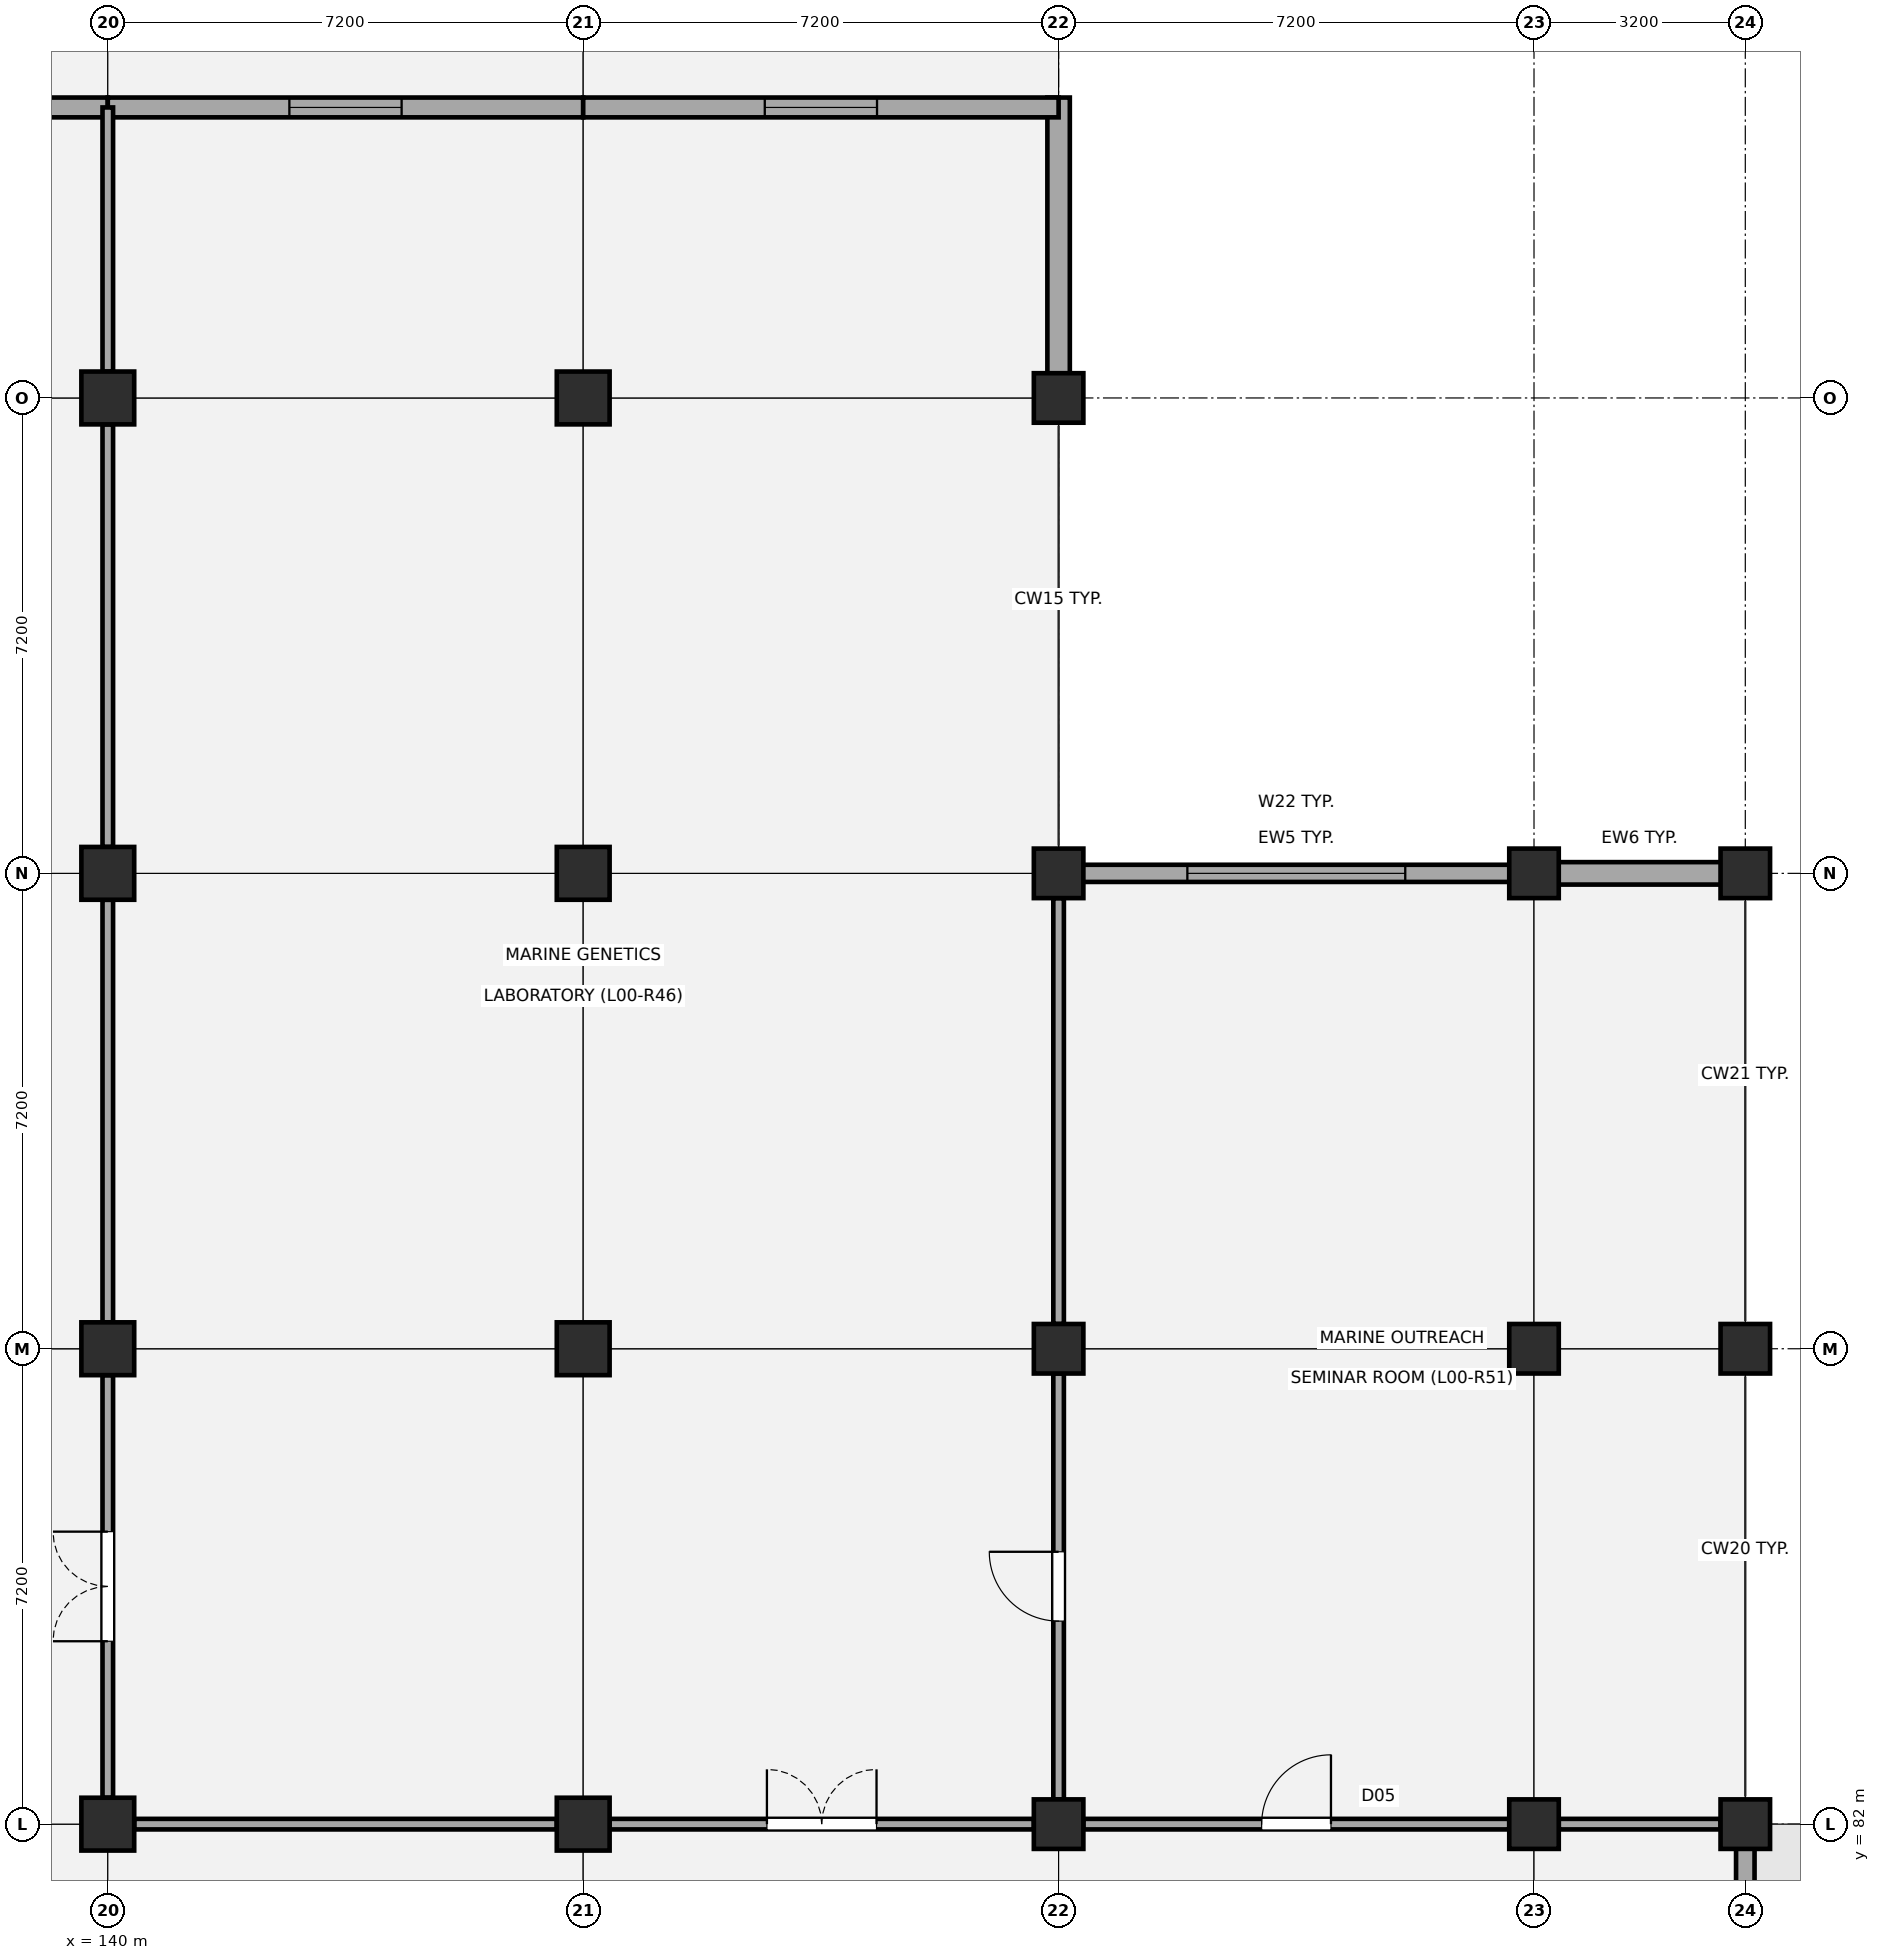
"""IFC4 building model, lengths in metres.
Left out: names, types, materials, properties, quantities, classifications, styles, units other than length and angle.
Written with IfcOpenShell. Run it as: python <this file> out.ifc"""

import sys

from ifc_helpers import new_model, si_unit, direction, frame, frame_2d, origin, origin_2d, place, context, subcontext, project, spatial, rectangle, circle, extrude, element, fill, save


model = new_model("IFC4")
c1 = context("Model", 3, precision=1e-05, world=origin(), true_north=direction((0.0, 1.0)))
c2 = subcontext(c1, "Body", "Model", "MODEL_VIEW")
j1 = project(units=[si_unit("LENGTHUNIT", "METRE"), si_unit("PLANEANGLEUNIT", "RADIAN")], contexts=[c1])
p1 = place(None, origin())
s1 = spatial("IfcSite", under=j1, at=p1, CompositionType="ELEMENT")
p2 = place(p1, origin())
s2 = spatial("IfcBuilding", under=s1, at=p2, CompositionType="ELEMENT")
p3 = place(p2, origin())
s3 = spatial("IfcBuildingStorey", under=s2, at=p3, CompositionType="ELEMENT", Elevation=0.0)
for number, where, z_axis, x_axis in (
    (1, (140.0, 82.0, -0.35), (0.0, 0.0, 1.0), (1.0, 0.0, 0.0)),
    (2, (140.0, 89.2, -0.35), (0.0, 0.0, 1.0), (1.0, 0.0, 0.0)),
    (3, (140.0, 96.4, -0.35), (0.0, 0.0, 1.0), (1.0, 0.0, 0.0)),
    (4, (140.0, 103.6, -0.35), (0.0, 0.0, 1.0), (1.0, 0.0, 0.0)),
    (5, (147.2, 82.0, -0.35), (0.0, 0.0, 1.0), (1.0, 0.0, 0.0)),
    (6, (147.2, 89.2, -0.35), (0.0, 0.0, 1.0), (1.0, 0.0, 0.0)),
    (7, (147.2, 96.4, -0.35), (0.0, 0.0, 1.0), (1.0, 0.0, 0.0)),
    (8, (147.2, 103.6, -0.35), (0.0, 0.0, 1.0), (1.0, 0.0, 0.0)),
):
    element("IfcColumn", number, at=place(p3, frame(where, z_axis=z_axis, x_axis=x_axis)), inside=s3, PredefinedType="COLUMN", context=c2, shape_type="SweptSolid", body=[
        extrude(rectangle(XDim=0.8, YDim=0.8, at=origin_2d()), origin(), (0.0, 0.0, 1.0), 5.03),
    ])
for number, where, z_axis, x_axis in (
    (9, (154.4, 82.0, -0.35), (0.0, 0.0, 1.0), (1.0, 0.0, 0.0)),
    (10, (154.4, 89.2, -0.35), (0.0, 0.0, 1.0), (1.0, 0.0, 0.0)),
    (11, (154.4, 96.4, -0.35), (0.0, 0.0, 1.0), (1.0, 0.0, 0.0)),
    (12, (154.4, 103.6, -0.35), (0.0, 0.0, 1.0), (1.0, 0.0, 0.0)),
    (13, (161.6, 82.0, -0.35), (0.0, 0.0, 1.0), (1.0, 0.0, 0.0)),
    (14, (161.6, 89.2, -0.35), (0.0, 0.0, 1.0), (1.0, 0.0, 0.0)),
    (15, (161.6, 96.4, -0.35), (0.0, 0.0, 1.0), (1.0, 0.0, 0.0)),
    (16, (164.8, 82.0, -0.35), (0.0, 0.0, 1.0), (1.0, 0.0, 0.0)),
    (17, (164.8, 89.2, -0.35), (0.0, 0.0, 1.0), (1.0, 0.0, 0.0)),
    (18, (164.8, 96.4, -0.35), (0.0, 0.0, 1.0), (1.0, 0.0, 0.0)),
):
    element("IfcColumn", number, at=place(p3, frame(where, z_axis=z_axis, x_axis=x_axis)), inside=s3, PredefinedType="COLUMN", context=c2, shape_type="SweptSolid", body=[
        extrude(circle(Radius=0.375, at=origin_2d()), origin(), (0.0, 0.0, 1.0), 5.03),
    ])
p4 = place(p3, frame((154.71, 96.4, 0.0), z_axis=(0.0, 0.0, 1.0), x_axis=(1.0, 0.0, 0.0)))
e19 = element("IfcWall", 19, at=p4, inside=s3, PredefinedType="STANDARD", context=c2, shape_type="SweptSolid", body=[
    extrude(rectangle(XDim=6.58, YDim=0.26, at=frame_2d((3.29, 0.0))), origin(), (0.0, 0.0, 1.0), 3.75),
])
p5 = place(p4, frame((1.64, 0.0, 0.95)))
e20 = element("IfcOpeningElement", 20, at=p5, cuts=e19, PredefinedType="OPENING", context=c2, shape_type="SweptSolid", body=[
    extrude(rectangle(XDim=3.3, YDim=1.95, at=frame_2d((1.65, 0.975))), frame((0.0, 0.14, 0.0), z_axis=(0.0, -1.0, 0.0), x_axis=(1.0, 0.0, 0.0)), (0.0, 0.0, 1.0), 0.28),
])
p6 = place(p3, frame((161.91, 96.4, 0.0), z_axis=(0.0, 0.0, 1.0), x_axis=(1.0, 0.0, 0.0)))
e21 = element("IfcWall", 21, at=p6, inside=s3, PredefinedType="STANDARD", context=c2, shape_type="SweptSolid", body=[
    extrude(rectangle(XDim=2.58, YDim=0.34, at=frame_2d((1.29, 0.0))), origin(), (0.0, 0.0, 1.0), 3.75),
])
p7 = place(p3, frame((154.4, 108.15, 0.0), z_axis=(0.0, 0.0, 1.0), x_axis=(0.0, -1.0, 0.0)))
e22 = element("IfcWall", 22, at=p7, inside=s3, PredefinedType="STANDARD", context=c2, shape_type="SweptSolid", body=[
    extrude(rectangle(XDim=4.24, YDim=0.34, at=frame_2d((2.12, 0.0))), origin(), (0.0, 0.0, 1.0), 3.67),
])
p8 = place(p3, frame((164.8, 81.69, 0.0), z_axis=(0.0, 0.0, 1.0), x_axis=(0.0, -1.0, 0.0)))
e23 = element("IfcWall", 23, at=p8, inside=s3, PredefinedType="STANDARD", context=c2, shape_type="SweptSolid", body=[
    extrude(rectangle(XDim=6.58, YDim=0.28, at=frame_2d((3.29, 0.0))), origin(), (0.0, 0.0, 1.0), 3.75),
])
p9 = place(p8, frame((2.08, 0.0, 0.0)))
e24 = element("IfcOpeningElement", 24, at=p9, cuts=e23, PredefinedType="OPENING", context=c2, shape_type="SweptSolid", body=[
    extrude(rectangle(XDim=2.42, YDim=2.42, at=frame_2d((1.21, 1.21))), frame((0.0, 0.15, 0.0), z_axis=(0.0, -1.0, 0.0), x_axis=(1.0, 0.0, 0.0)), (0.0, 0.0, 1.0), 0.3),
])
p10 = place(p3, frame((132.8, 108.0, 0.0), z_axis=(0.0, 0.0, 1.0), x_axis=(1.0, 0.0, 0.0)))
e25 = element("IfcWall", 25, at=p10, inside=s3, PredefinedType="STANDARD", context=c2, shape_type="SweptSolid", body=[
    extrude(rectangle(XDim=7.2, YDim=0.3, at=frame_2d((3.6, 0.0))), origin(), (0.0, 0.0, 1.0), 4.37),
])
p11 = place(p10, frame((2.46, 0.0, 0.0)))
e26 = element("IfcOpeningElement", 26, at=p11, cuts=e25, PredefinedType="OPENING", context=c2, shape_type="SweptSolid", body=[
    extrude(rectangle(XDim=2.28, YDim=2.4, at=frame_2d((1.14, 1.2))), frame((0.0, 0.16, 0.0), z_axis=(0.0, -1.0, 0.0), x_axis=(1.0, 0.0, 0.0)), (0.0, 0.0, 1.0), 0.32),
])
p12 = place(p3, frame((140.0, 108.0, 0.0), z_axis=(0.0, 0.0, 1.0), x_axis=(1.0, 0.0, 0.0)))
e27 = element("IfcWall", 27, at=p12, inside=s3, PredefinedType="STANDARD", context=c2, shape_type="SweptSolid", body=[
    extrude(rectangle(XDim=7.2, YDim=0.3, at=frame_2d((3.6, 0.0))), origin(), (0.0, 0.0, 1.0), 4.37),
])
p13 = place(p12, frame((2.75, 0.0, 0.95)))
e28 = element("IfcOpeningElement", 28, at=p13, cuts=e27, PredefinedType="OPENING", context=c2, shape_type="SweptSolid", body=[
    extrude(rectangle(XDim=1.7, YDim=1.75, at=frame_2d((0.85, 0.875))), frame((0.0, 0.16, 0.0), z_axis=(0.0, -1.0, 0.0), x_axis=(1.0, 0.0, 0.0)), (0.0, 0.0, 1.0), 0.32),
])
p14 = place(p3, frame((147.2, 108.0, 0.0), z_axis=(0.0, 0.0, 1.0), x_axis=(1.0, 0.0, 0.0)))
e29 = element("IfcWall", 29, at=p14, inside=s3, PredefinedType="STANDARD", context=c2, shape_type="SweptSolid", body=[
    extrude(rectangle(XDim=7.2, YDim=0.3, at=frame_2d((3.6, 0.0))), origin(), (0.0, 0.0, 1.0), 4.37),
])
p15 = place(p14, frame((2.75, 0.0, 0.95)))
e30 = element("IfcOpeningElement", 30, at=p15, cuts=e29, PredefinedType="OPENING", context=c2, shape_type="SweptSolid", body=[
    extrude(rectangle(XDim=1.7, YDim=1.75, at=frame_2d((0.85, 0.875))), frame((0.0, 0.16, 0.0), z_axis=(0.0, -1.0, 0.0), x_axis=(1.0, 0.0, 0.0)), (0.0, 0.0, 1.0), 0.32),
])
p16 = place(p3, frame((140.0, 82.4, 0.0), z_axis=(0.0, 0.0, 1.0), x_axis=(0.0, 1.0, 0.0)))
e31 = element("IfcWall", 31, at=p16, inside=s3, PredefinedType="PARTITIONING", context=c2, shape_type="SweptSolid", body=[
    extrude(rectangle(XDim=6.4, YDim=0.16, at=frame_2d((3.2, 0.0))), origin(), (0.0, 0.0, 1.0), 3.62),
])
p17 = place(p16, frame((2.37, 0.0, 0.0)))
e32 = element("IfcOpeningElement", 32, at=p17, cuts=e31, PredefinedType="OPENING", context=c2, shape_type="SweptSolid", body=[
    extrude(rectangle(XDim=1.66, YDim=2.22, at=frame_2d((0.83, 1.11))), frame((0.0, 0.09, 0.0), z_axis=(0.0, -1.0, 0.0), x_axis=(1.0, 0.0, 0.0)), (0.0, 0.0, 1.0), 0.18),
])
for number, where, z_axis, x_axis in (
    (33, (140.0, 89.6, 0.0), (0.0, 0.0, 1.0), (0.0, 1.0, 0.0)),
    (34, (140.0, 96.8, 0.0), (0.0, 0.0, 1.0), (0.0, 1.0, 0.0)),
):
    element("IfcWall", number, at=place(p3, frame(where, z_axis=z_axis, x_axis=x_axis)), inside=s3, PredefinedType="PARTITIONING", context=c2, shape_type="SweptSolid", body=[
        extrude(rectangle(XDim=6.4, YDim=0.16, at=frame_2d((3.2, 0.0))), origin(), (0.0, 0.0, 1.0), 3.62),
    ])
p18 = place(p3, frame((140.0, 104.0, 0.0), z_axis=(0.0, 0.0, 1.0), x_axis=(0.0, 1.0, 0.0)))
e35 = element("IfcWall", 35, at=p18, inside=s3, PredefinedType="PARTITIONING", context=c2, shape_type="SweptSolid", body=[
    extrude(rectangle(XDim=4.0, YDim=0.16, at=frame_2d((2.0, 0.0))), origin(), (0.0, 0.0, 1.0), 3.62),
])
p19 = place(p3, frame((140.4, 82.0, 0.0), z_axis=(0.0, 0.0, 1.0), x_axis=(1.0, 0.0, 0.0)))
e36 = element("IfcWall", 36, at=p19, inside=s3, PredefinedType="PARTITIONING", context=c2, shape_type="SweptSolid", body=[
    extrude(rectangle(XDim=6.4, YDim=0.16, at=frame_2d((3.2, 0.0))), origin(), (0.0, 0.0, 1.0), 3.52),
])
p20 = place(p3, frame((147.6, 82.0, 0.0), z_axis=(0.0, 0.0, 1.0), x_axis=(1.0, 0.0, 0.0)))
e37 = element("IfcWall", 37, at=p20, inside=s3, PredefinedType="PARTITIONING", context=c2, shape_type="SweptSolid", body=[
    extrude(rectangle(XDim=6.425, YDim=0.16, at=frame_2d((3.212, 0.0))), origin(), (0.0, 0.0, 1.0), 3.62),
])
p21 = place(p20, frame((2.383, 0.0, 0.0)))
e38 = element("IfcOpeningElement", 38, at=p21, cuts=e37, PredefinedType="OPENING", context=c2, shape_type="SweptSolid", body=[
    extrude(rectangle(XDim=1.66, YDim=2.22, at=frame_2d((0.83, 1.11))), frame((0.0, 0.09, 0.0), z_axis=(0.0, -1.0, 0.0), x_axis=(1.0, 0.0, 0.0)), (0.0, 0.0, 1.0), 0.18),
])
p22 = place(p3, frame((154.4, 82.375, 0.0), z_axis=(0.0, 0.0, 1.0), x_axis=(0.0, 1.0, 0.0)))
e39 = element("IfcWall", 39, at=p22, inside=s3, PredefinedType="PARTITIONING", context=c2, shape_type="SweptSolid", body=[
    extrude(rectangle(XDim=6.45, YDim=0.16, at=frame_2d((3.225, 0.0))), origin(), (0.0, 0.0, 1.0), 3.62),
])
p23 = place(p22, frame((2.7, 0.0, 0.0)))
e40 = element("IfcOpeningElement", 40, at=p23, cuts=e39, PredefinedType="OPENING", context=c2, shape_type="SweptSolid", body=[
    extrude(rectangle(XDim=1.05, YDim=2.14, at=frame_2d((0.525, 1.07))), frame((0.0, 0.09, 0.0), z_axis=(0.0, -1.0, 0.0), x_axis=(1.0, 0.0, 0.0)), (0.0, 0.0, 1.0), 0.18),
])
p24 = place(p3, frame((154.4, 89.575, 0.0), z_axis=(0.0, 0.0, 1.0), x_axis=(0.0, 1.0, 0.0)))
e41 = element("IfcWall", 41, at=p24, inside=s3, PredefinedType="PARTITIONING", context=c2, shape_type="SweptSolid", body=[
    extrude(rectangle(XDim=6.45, YDim=0.16, at=frame_2d((3.225, 0.0))), origin(), (0.0, 0.0, 1.0), 3.62),
])
p25 = place(p3, frame((154.775, 82.0, 0.0), z_axis=(0.0, 0.0, 1.0), x_axis=(1.0, 0.0, 0.0)))
e42 = element("IfcWall", 42, at=p25, inside=s3, PredefinedType="PARTITIONING", context=c2, shape_type="SweptSolid", body=[
    extrude(rectangle(XDim=6.45, YDim=0.16, at=frame_2d((3.225, 0.0))), origin(), (0.0, 0.0, 1.0), 3.6),
])
p26 = place(p25, frame((2.7, 0.0, 0.0)))
e43 = element("IfcOpeningElement", 43, at=p26, cuts=e42, PredefinedType="OPENING", context=c2, shape_type="SweptSolid", body=[
    extrude(rectangle(XDim=1.05, YDim=2.14, at=frame_2d((0.525, 1.07))), frame((0.0, 0.09, 0.0), z_axis=(0.0, -1.0, 0.0), x_axis=(1.0, 0.0, 0.0)), (0.0, 0.0, 1.0), 0.18),
])
p27 = place(p3, frame((161.975, 82.0, 0.0), z_axis=(0.0, 0.0, 1.0), x_axis=(1.0, 0.0, 0.0)))
e44 = element("IfcWall", 44, at=p27, inside=s3, PredefinedType="PARTITIONING", context=c2, shape_type="SweptSolid", body=[
    extrude(rectangle(XDim=2.45, YDim=0.16, at=frame_2d((1.225, 0.0))), origin(), (0.0, 0.0, 1.0), 3.7),
])
p28 = place(p5, origin())
e45 = element("IfcWindow", 45, at=p28, inside=s3, PartitioningType="SINGLE_PANEL", PredefinedType="WINDOW", context=c2, shape_type="SweptSolid", body=[
    extrude(rectangle(XDim=3.3, YDim=1.95, at=frame_2d((1.65, 0.975))), frame((0.0, 0.03, 0.0), z_axis=(0.0, -1.0, 0.0), x_axis=(1.0, 0.0, 0.0)), (0.0, 0.0, 1.0), 0.06),
])
fill(e20, e45)
p29 = place(p13, origin())
e46 = element("IfcWindow", 46, at=p29, inside=s3, PartitioningType="SINGLE_PANEL", PredefinedType="WINDOW", context=c2, shape_type="SweptSolid", body=[
    extrude(rectangle(XDim=1.7, YDim=1.75, at=frame_2d((0.85, 0.875))), frame((0.0, 0.03, 0.0), z_axis=(0.0, -1.0, 0.0), x_axis=(1.0, 0.0, 0.0)), (0.0, 0.0, 1.0), 0.06),
])
fill(e28, e46)
p30 = place(p15, origin())
e47 = element("IfcWindow", 47, at=p30, inside=s3, PartitioningType="SINGLE_PANEL", PredefinedType="WINDOW", context=c2, shape_type="SweptSolid", body=[
    extrude(rectangle(XDim=1.7, YDim=1.75, at=frame_2d((0.85, 0.875))), frame((0.0, 0.03, 0.0), z_axis=(0.0, -1.0, 0.0), x_axis=(1.0, 0.0, 0.0)), (0.0, 0.0, 1.0), 0.06),
])
fill(e30, e47)
p31 = place(p17, origin())
e48 = element("IfcDoor", 48, at=p31, inside=s3, OperationType="DOUBLE_DOOR_SINGLE_SWING", PredefinedType="DOOR", context=c2, shape_type="SweptSolid", body=[
    extrude(rectangle(XDim=1.66, YDim=2.22, at=frame_2d((0.83, 1.11))), frame((0.0, 0.025, 0.0), z_axis=(0.0, -1.0, 0.0), x_axis=(1.0, 0.0, 0.0)), (0.0, 0.0, 1.0), 0.05),
])
fill(e32, e48)
p32 = place(p21, origin())
e49 = element("IfcDoor", 49, at=p32, inside=s3, OperationType="DOUBLE_DOOR_SINGLE_SWING", PredefinedType="DOOR", context=c2, shape_type="SweptSolid", body=[
    extrude(rectangle(XDim=1.66, YDim=2.22, at=frame_2d((0.83, 1.11))), frame((0.0, 0.025, 0.0), z_axis=(0.0, -1.0, 0.0), x_axis=(1.0, 0.0, 0.0)), (0.0, 0.0, 1.0), 0.05),
])
fill(e38, e49)
p33 = place(p26, origin())
e50 = element("IfcDoor", 50, at=p33, inside=s3, OperationType="SINGLE_SWING_RIGHT", PredefinedType="DOOR", context=c2, shape_type="SweptSolid", body=[
    extrude(rectangle(XDim=1.05, YDim=2.14, at=frame_2d((0.525, 1.07))), frame((0.0, 0.025, 0.0), z_axis=(0.0, -1.0, 0.0), x_axis=(1.0, 0.0, 0.0)), (0.0, 0.0, 1.0), 0.05),
])
fill(e43, e50)
p34 = place(p23, origin())
e51 = element("IfcDoor", 51, at=p34, inside=s3, OperationType="SINGLE_SWING_RIGHT", PredefinedType="DOOR", context=c2, shape_type="SweptSolid", body=[
    extrude(rectangle(XDim=1.05, YDim=2.14, at=frame_2d((0.525, 1.07))), frame((0.0, 0.025, 0.0), z_axis=(0.0, -1.0, 0.0), x_axis=(1.0, 0.0, 0.0)), (0.0, 0.0, 1.0), 0.05),
])
fill(e40, e51)
save(model, sys.argv[1])
